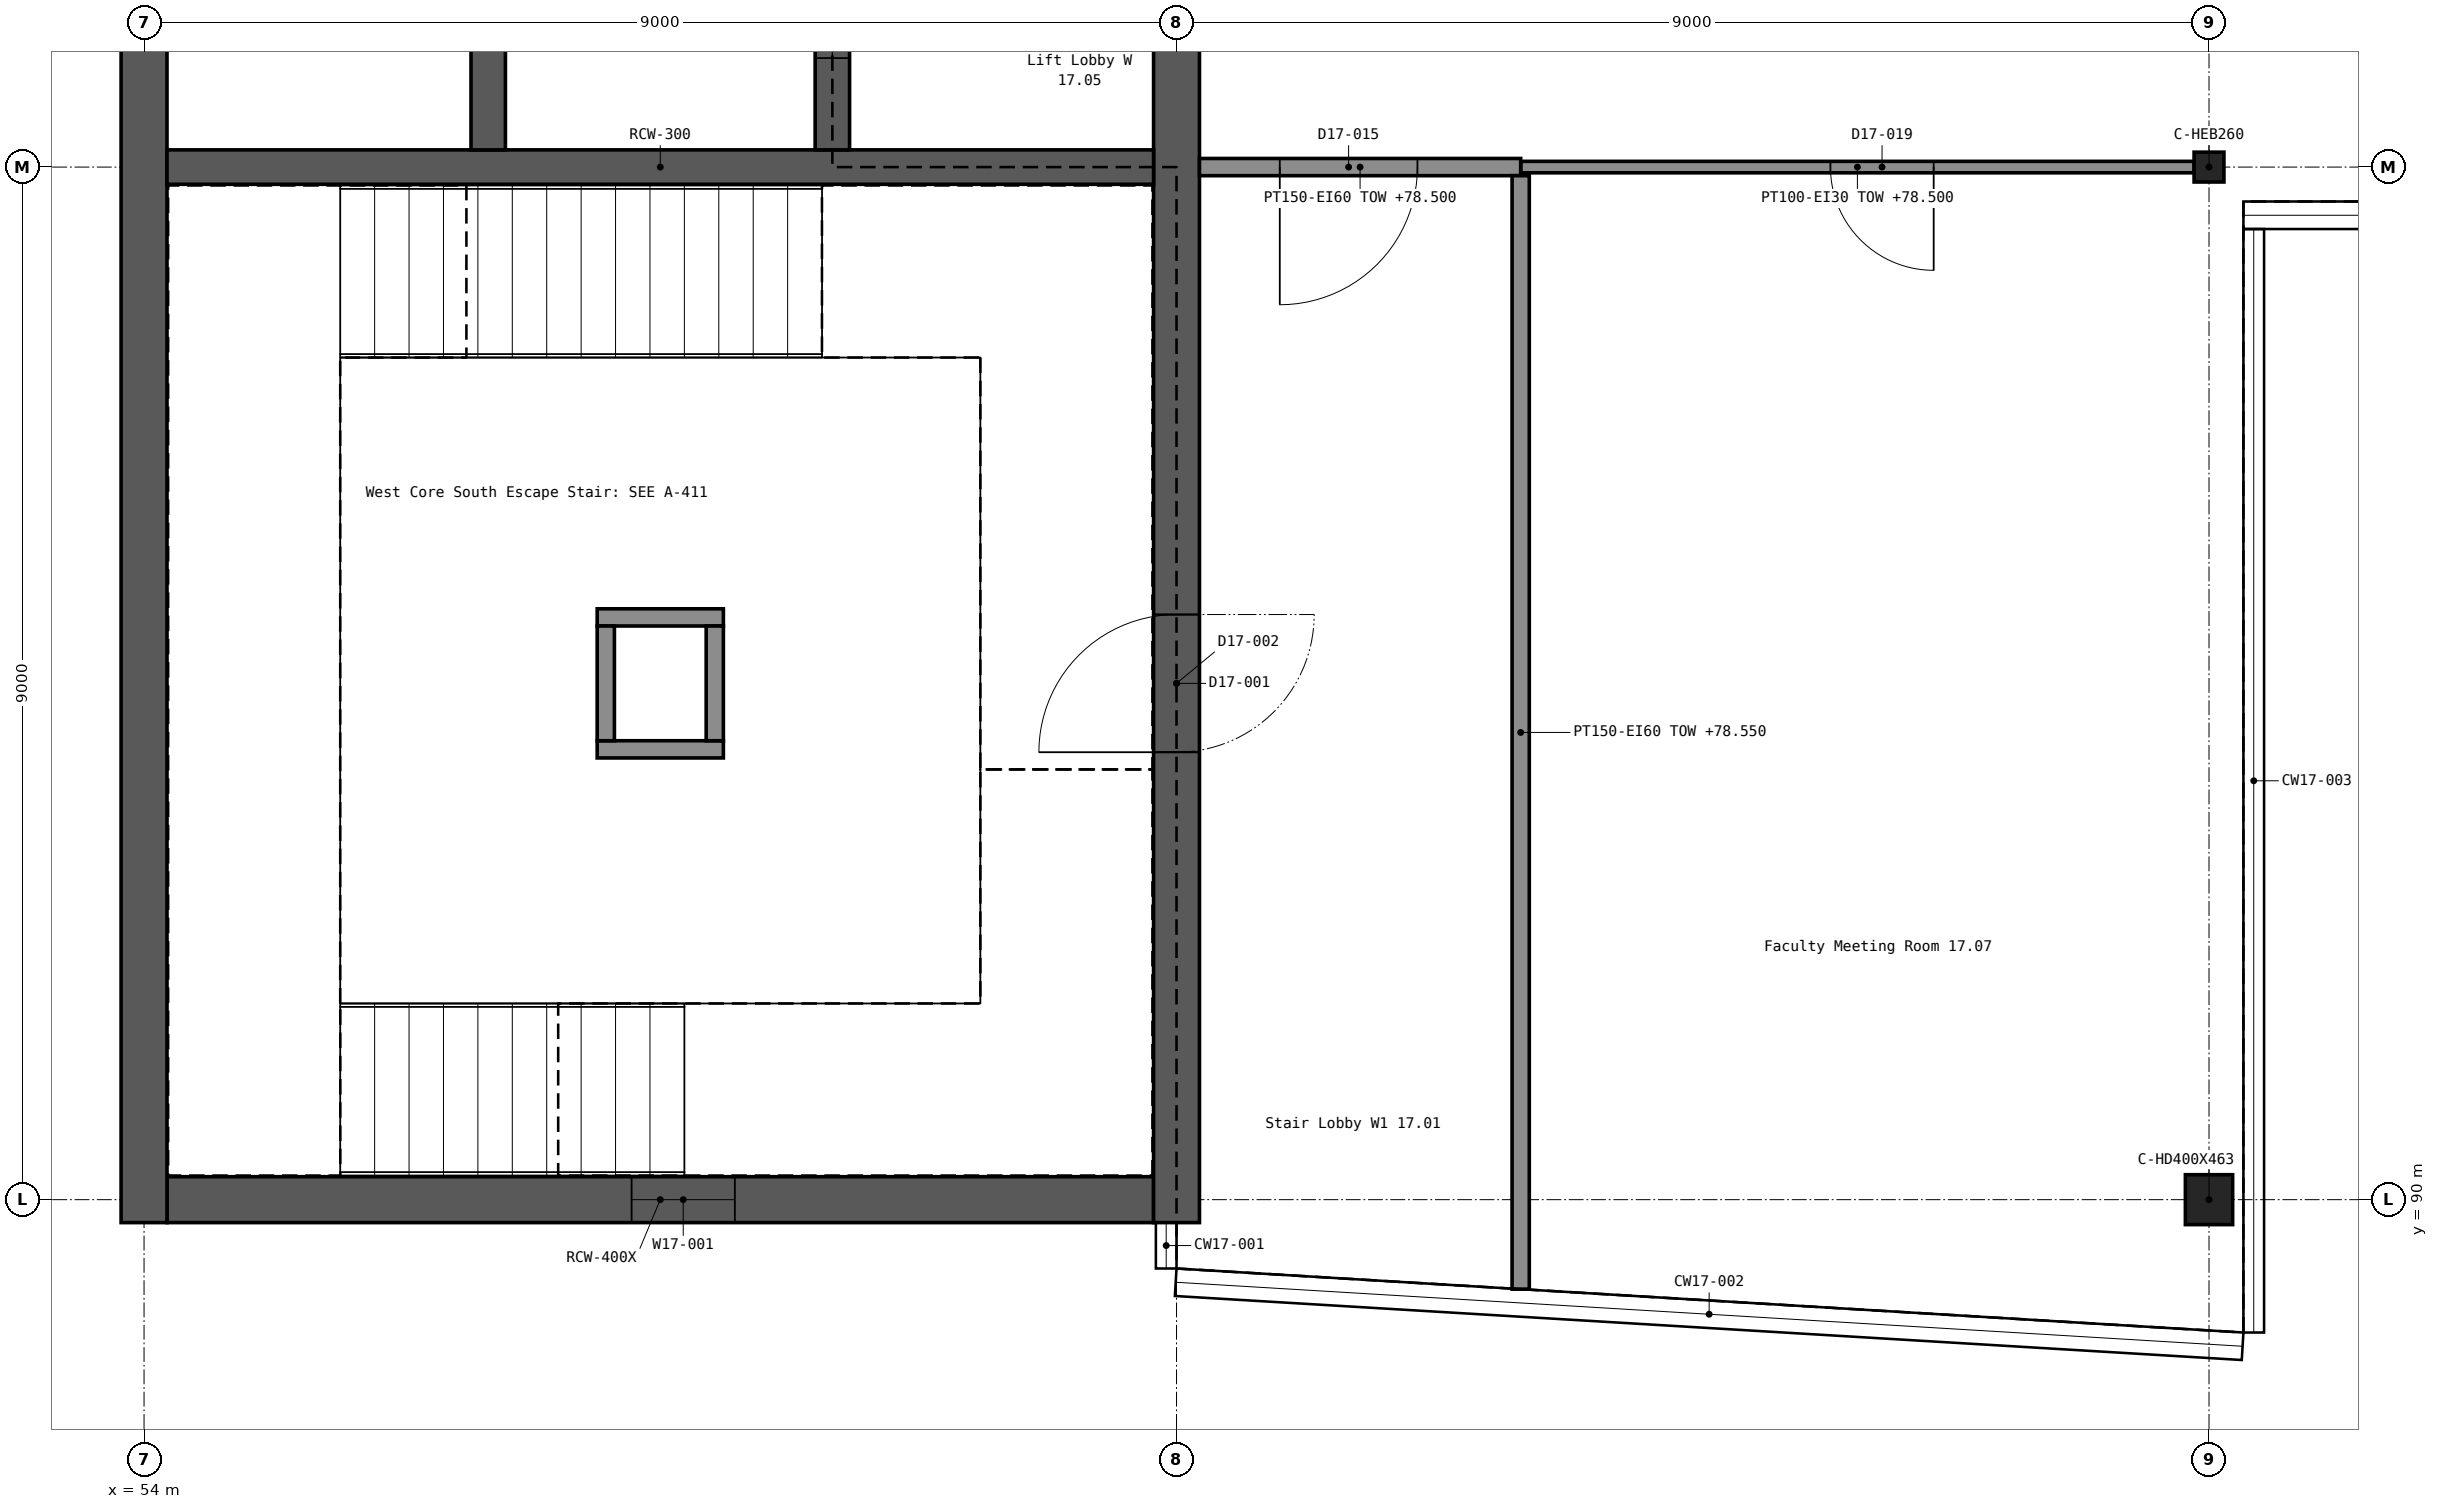
"""IFC4 building model, lengths in metres.
Left out: names, types, materials, properties, quantities, classifications, styles, units other than length and angle.
Written with IfcOpenShell. Run it as: python <this file> out.ifc"""

import sys

from ifc_helpers import new_model, si_unit, direction, frame, frame_2d, origin, origin_2d, place, context, subcontext, project, spatial, rectangle, i_section, extrude, element, fill, save


model = new_model("IFC4")
c1 = context("Model", 3, precision=1e-05, world=origin(), true_north=direction((0.0, 1.0)))
c2 = subcontext(c1, "Body", "Model", "MODEL_VIEW")
j1 = project(units=[si_unit("LENGTHUNIT", "METRE"), si_unit("PLANEANGLEUNIT", "RADIAN")], contexts=[c1])
p1 = place(None, origin())
s1 = spatial("IfcSite", under=j1, at=p1, CompositionType="ELEMENT")
p2 = place(p1, origin())
s2 = spatial("IfcBuilding", under=s1, at=p2, CompositionType="ELEMENT")
p3 = place(p2, frame((0.0, 0.0, 75.3)))
s3 = spatial("IfcBuildingStorey", under=s2, at=p3, CompositionType="ELEMENT", Elevation=75.3)
p4 = place(p3, frame((54.2, 90.0, 0.0), z_axis=(0.0, 0.0, 1.0), x_axis=(1.0, 0.0, 0.0)))
e1 = element("IfcWall", 1, at=p4, inside=s3, PredefinedType="SHEAR", context=c2, shape_type="SweptSolid", body=[
    extrude(rectangle(XDim=8.6, YDim=0.4, at=frame_2d((4.3, 0.0))), origin(), (0.0, 0.0, 1.0), 7.5),
])
p5 = place(p4, frame((4.05, 0.0, 1.2)))
e2 = element("IfcOpeningElement", 2, at=p5, cuts=e1, PredefinedType="OPENING", context=c2, shape_type="SweptSolid", body=[
    extrude(rectangle(XDim=0.9, YDim=1.5, at=frame_2d((0.45, 0.75))), frame((0.0, 0.211, 0.0), z_axis=(0.0, -1.0, 0.0), x_axis=(1.0, 0.0, 0.0)), (0.0, 0.0, 1.0), 0.422),
])
p6 = place(p3, frame((54.0, 89.8, 0.0), z_axis=(0.0, 0.0, 1.0), x_axis=(0.0, 1.0, 0.0)))
e3 = element("IfcWall", 3, at=p6, inside=s3, PredefinedType="SHEAR", context=c2, shape_type="SweptSolid", body=[
    extrude(rectangle(XDim=27.4, YDim=0.4, at=frame_2d((13.7, 0.0))), origin(), (0.0, 0.0, 1.0), 7.5),
])
p7 = place(p3, frame((63.0, 89.8, 0.0), z_axis=(0.0, 0.0, 1.0), x_axis=(0.0, 1.0, 0.0)))
e4 = element("IfcWall", 4, at=p7, inside=s3, PredefinedType="SHEAR", context=c2, shape_type="SweptSolid", body=[
    extrude(rectangle(XDim=27.4, YDim=0.4, at=frame_2d((13.7, 0.0))), origin(), (0.0, 0.0, 1.0), 7.5),
])
p8 = place(p7, frame((4.1, 0.0, 0.0)))
e5 = element("IfcOpeningElement", 5, at=p8, cuts=e4, PredefinedType="OPENING", context=c2, shape_type="SweptSolid", body=[
    extrude(rectangle(XDim=1.2, YDim=2.1, at=frame_2d((0.6, 1.05))), frame((0.0, 0.211, 0.0), z_axis=(0.0, -1.0, 0.0), x_axis=(1.0, 0.0, 0.0)), (0.0, 0.0, 1.0), 0.422),
])
p9 = place(p7, frame((4.1, 0.0, 3.9)))
e6 = element("IfcOpeningElement", 6, at=p9, cuts=e4, PredefinedType="OPENING", context=c2, shape_type="SweptSolid", body=[
    extrude(rectangle(XDim=1.2, YDim=2.1, at=frame_2d((0.6, 1.05))), frame((0.0, 0.211, 0.0), z_axis=(0.0, -1.0, 0.0), x_axis=(1.0, 0.0, 0.0)), (0.0, 0.0, 1.0), 0.422),
])
p10 = place(p7, frame((22.1, 0.0, 0.0)))
e7 = element("IfcOpeningElement", 7, at=p10, cuts=e4, PredefinedType="OPENING", context=c2, shape_type="SweptSolid", body=[
    extrude(rectangle(XDim=1.2, YDim=2.1, at=frame_2d((0.6, 1.05))), frame((0.0, 0.211, 0.0), z_axis=(0.0, -1.0, 0.0), x_axis=(1.0, 0.0, 0.0)), (0.0, 0.0, 1.0), 0.422),
])
p11 = place(p7, frame((22.1, 0.0, 3.9)))
e8 = element("IfcOpeningElement", 8, at=p11, cuts=e4, PredefinedType="OPENING", context=c2, shape_type="SweptSolid", body=[
    extrude(rectangle(XDim=1.2, YDim=2.1, at=frame_2d((0.6, 1.05))), frame((0.0, 0.211, 0.0), z_axis=(0.0, -1.0, 0.0), x_axis=(1.0, 0.0, 0.0)), (0.0, 0.0, 1.0), 0.422),
])
p12 = place(p7, frame((12.5, 0.0, 0.0)))
e9 = element("IfcOpeningElement", 9, at=p12, cuts=e4, PredefinedType="OPENING", context=c2, shape_type="SweptSolid", body=[
    extrude(rectangle(XDim=2.0, YDim=2.1, at=frame_2d((1.0, 1.05))), frame((0.0, 0.211, 0.0), z_axis=(0.0, -1.0, 0.0), x_axis=(1.0, 0.0, 0.0)), (0.0, 0.0, 1.0), 0.422),
])
p13 = place(p3, frame((54.2, 99.0, 0.0), z_axis=(0.0, 0.0, 1.0), x_axis=(1.0, 0.0, 0.0)))
e10 = element("IfcWall", 10, at=p13, inside=s3, PredefinedType="SHEAR", context=c2, shape_type="SweptSolid", body=[
    extrude(rectangle(XDim=8.6, YDim=0.3, at=frame_2d((4.3, 0.0))), origin(), (0.0, 0.0, 1.0), 7.5),
])
p14 = place(p3, frame((57.0, 99.15, 0.0), z_axis=(0.0, 0.0, 1.0), x_axis=(0.0, 1.0, 0.0)))
e11 = element("IfcWall", 11, at=p14, inside=s3, PredefinedType="SHEAR", context=c2, shape_type="SweptSolid", body=[
    extrude(rectangle(XDim=8.7, YDim=0.3, at=frame_2d((4.35, 0.0))), origin(), (0.0, 0.0, 1.0), 7.5),
])
p15 = place(p3, frame((60.0, 99.15, 0.0), z_axis=(0.0, 0.0, 1.0), x_axis=(0.0, 1.0, 0.0)))
e12 = element("IfcWall", 12, at=p15, inside=s3, PredefinedType="SHEAR", context=c2, shape_type="SweptSolid", body=[
    extrude(rectangle(XDim=8.7, YDim=0.3, at=frame_2d((4.35, 0.0))), origin(), (0.0, 0.0, 1.0), 7.5),
])
p16 = place(p15, frame((0.8, 0.0, 0.0)))
e13 = element("IfcOpeningElement", 13, at=p16, cuts=e12, PredefinedType="OPENING", context=c2, shape_type="SweptSolid", body=[
    extrude(rectangle(XDim=1.1, YDim=2.1, at=frame_2d((0.55, 1.05))), frame((0.0, 0.161, 0.0), z_axis=(0.0, -1.0, 0.0), x_axis=(1.0, 0.0, 0.0)), (0.0, 0.0, 1.0), 0.322),
])
p17 = place(p15, frame((3.8, 0.0, 0.0)))
e14 = element("IfcOpeningElement", 14, at=p17, cuts=e12, PredefinedType="OPENING", context=c2, shape_type="SweptSolid", body=[
    extrude(rectangle(XDim=1.1, YDim=2.1, at=frame_2d((0.55, 1.05))), frame((0.0, 0.161, 0.0), z_axis=(0.0, -1.0, 0.0), x_axis=(1.0, 0.0, 0.0)), (0.0, 0.0, 1.0), 0.322),
])
p18 = place(p15, frame((6.8, 0.0, 0.0)))
e15 = element("IfcOpeningElement", 15, at=p18, cuts=e12, PredefinedType="OPENING", context=c2, shape_type="SweptSolid", body=[
    extrude(rectangle(XDim=1.1, YDim=2.1, at=frame_2d((0.55, 1.05))), frame((0.0, 0.161, 0.0), z_axis=(0.0, -1.0, 0.0), x_axis=(1.0, 0.0, 0.0)), (0.0, 0.0, 1.0), 0.322),
])
p19 = place(p3, frame((72.0, 90.0, 0.0), z_axis=(0.0, 0.0, 1.0), x_axis=(1.0, 0.0, 0.0)))
e16 = element("IfcColumn", 16, at=p19, inside=s3, PredefinedType="COLUMN", context=c2, shape_type="SweptSolid", body=[
    extrude(i_section(OverallWidth=0.412, OverallDepth=0.435, WebThickness=0.036, FlangeThickness=0.057, FilletRadius=0.015, at=origin_2d()), origin(), (0.0, 0.0, 1.0), 3.9),
])
p20 = place(p3, frame((72.0, 99.0, 0.0), z_axis=(0.0, 0.0, 1.0), x_axis=(1.0, 0.0, 0.0)))
e17 = element("IfcColumn", 17, at=p20, inside=s3, PredefinedType="COLUMN", context=c2, shape_type="SweptSolid", body=[
    extrude(i_section(OverallWidth=0.26, OverallDepth=0.26, WebThickness=0.01, FlangeThickness=0.018, FilletRadius=0.024, at=origin_2d()), origin(), (0.0, 0.0, 1.0), 3.9),
])
p21 = place(p3, frame((63.125, 89.8, 3.9), z_axis=(0.0, 0.0, 1.0), x_axis=(0.0, -1.0, 0.0)))
e18 = element("IfcWall", 18, at=p21, inside=s3, PredefinedType="PARAPET", context=c2, shape_type="SweptSolid", body=[
    extrude(rectangle(XDim=0.415, YDim=0.25, at=frame_2d((0.208, 0.0))), origin(), (0.0, 0.0, 1.0), 1.1),
])
p22 = place(p3, frame((63.25, 89.51, 3.9), z_axis=(0.0, 0.0, 1.0), x_axis=(0.998206819367, -0.059859383295, 0.0)))
e19 = element("IfcWall", 19, at=p22, inside=s3, PredefinedType="PARAPET", context=c2, shape_type="SweptSolid", body=[
    extrude(rectangle(XDim=2.957, YDim=0.25, at=frame_2d((1.479, 0.0))), origin(), (0.0, 0.0, 1.0), 2.7),
])
p23 = place(p3, frame((66.201, 89.333, 3.9), z_axis=(0.0, 0.0, 1.0), x_axis=(0.998201585904, -0.059946592056, 0.0)))
e20 = element("IfcWall", 20, at=p23, inside=s3, PredefinedType="PARAPET", context=c2, shape_type="SweptSolid", body=[
    extrude(rectangle(XDim=2.957, YDim=0.25, at=frame_2d((1.479, 0.0))), origin(), (0.0, 0.0, 1.0), 3.1),
])
p24 = place(p3, frame((69.153, 89.156, 3.9), z_axis=(0.0, 0.0, 1.0), x_axis=(0.998206819367, -0.059859383295, 0.0)))
e21 = element("IfcWall", 21, at=p24, inside=s3, PredefinedType="PARAPET", context=c2, shape_type="SweptSolid", body=[
    extrude(rectangle(XDim=2.957, YDim=0.25, at=frame_2d((1.479, 0.0))), origin(), (0.0, 0.0, 1.0), 3.4),
])
p25 = place(p3, frame((72.104, 88.979, 3.9), z_axis=(0.0, 0.0, 1.0), x_axis=(0.998201585904, -0.059946592056, 0.0)))
e22 = element("IfcWall", 22, at=p25, inside=s3, PredefinedType="PARAPET", context=c2, shape_type="SweptSolid", body=[
    extrude(rectangle(XDim=2.957, YDim=0.25, at=frame_2d((1.479, 0.0))), origin(), (0.0, 0.0, 1.0), 3.6),
])
p26 = place(p3, frame((54.0, 89.85, 7.5), z_axis=(0.0, 0.0, 1.0), x_axis=(0.0, 1.0, 0.0)))
e23 = element("IfcWall", 23, at=p26, inside=s3, PredefinedType="PARAPET", context=c2, shape_type="SweptSolid", body=[
    extrude(rectangle(XDim=27.3, YDim=0.3, at=frame_2d((13.65, 0.0))), origin(), (0.0, 0.0, 1.0), 1.1),
])
p27 = place(p3, frame((63.0, 89.85, 7.5), z_axis=(0.0, 0.0, 1.0), x_axis=(0.0, 1.0, 0.0)))
e24 = element("IfcWall", 24, at=p27, inside=s3, PredefinedType="PARAPET", context=c2, shape_type="SweptSolid", body=[
    extrude(rectangle(XDim=8.55, YDim=0.3, at=frame_2d((4.275, 0.0))), origin(), (0.0, 0.0, 1.0), 1.1),
])
p28 = place(p3, frame((54.15, 90.0, 7.5), z_axis=(0.0, 0.0, 1.0), x_axis=(1.0, 0.0, 0.0)))
e25 = element("IfcWall", 25, at=p28, inside=s3, PredefinedType="PARAPET", context=c2, shape_type="SweptSolid", body=[
    extrude(rectangle(XDim=8.7, YDim=0.3, at=frame_2d((4.35, 0.0))), origin(), (0.0, 0.0, 1.0), 1.1),
])
for number, where, z_axis, x_axis in (
    (26, (57.95, 93.925, 7.5), (0.0, 0.0, 1.0), (1.0, 0.0, 0.0)),
    (27, (57.95, 95.075, 7.5), (0.0, 0.0, 1.0), (1.0, 0.0, 0.0)),
):
    element("IfcWall", number, at=place(p3, frame(where, z_axis=z_axis, x_axis=x_axis)), inside=s3, PredefinedType="SOLIDWALL", context=c2, shape_type="SweptSolid", body=[
        extrude(rectangle(XDim=1.1, YDim=0.15, at=frame_2d((0.55, 0.0))), origin(), (0.0, 0.0, 1.0), 0.15),
    ])
for number, where, z_axis, x_axis in (
    (28, (58.025, 94.0, 7.5), (0.0, 0.0, 1.0), (0.0, 1.0, 0.0)),
    (29, (58.975, 94.0, 7.5), (0.0, 0.0, 1.0), (0.0, 1.0, 0.0)),
):
    element("IfcWall", number, at=place(p3, frame(where, z_axis=z_axis, x_axis=x_axis)), inside=s3, PredefinedType="SOLIDWALL", context=c2, shape_type="SweptSolid", body=[
        extrude(rectangle(XDim=1.0, YDim=0.15, at=frame_2d((0.5, 0.0))), origin(), (0.0, 0.0, 1.0), 0.15),
    ])
p29 = place(p3, frame((66.0, 99.0, 0.0), z_axis=(0.0, 0.0, 1.0), x_axis=(1.0, 0.0, 0.0)))
e30 = element("IfcWall", 30, at=p29, inside=s3, PredefinedType="PARTITIONING", context=c2, shape_type="SweptSolid", body=[
    extrude(rectangle(XDim=5.87, YDim=0.1, at=frame_2d((2.935, 0.0))), origin(), (0.0, 0.0, 1.0), 3.2),
])
p30 = place(p29, frame((2.7, 0.0, 0.0)))
e31 = element("IfcOpeningElement", 31, at=p30, cuts=e30, PredefinedType="OPENING", context=c2, shape_type="SweptSolid", body=[
    extrude(rectangle(XDim=0.9, YDim=2.1, at=frame_2d((0.45, 1.05))), frame((0.0, 0.061, 0.0), z_axis=(0.0, -1.0, 0.0), x_axis=(1.0, 0.0, 0.0)), (0.0, 0.0, 1.0), 0.122),
])
p31 = place(p3, frame((63.2, 99.0, 0.0), z_axis=(0.0, 0.0, 1.0), x_axis=(1.0, 0.0, 0.0)))
e32 = element("IfcWall", 32, at=p31, inside=s3, PredefinedType="PARTITIONING", context=c2, shape_type="SweptSolid", body=[
    extrude(rectangle(XDim=2.8, YDim=0.15, at=frame_2d((1.4, 0.0))), origin(), (0.0, 0.0, 1.0), 3.2),
])
p32 = place(p31, frame((0.7, 0.0, 0.0)))
e33 = element("IfcOpeningElement", 33, at=p32, cuts=e32, PredefinedType="OPENING", context=c2, shape_type="SweptSolid", body=[
    extrude(rectangle(XDim=1.2, YDim=2.1, at=frame_2d((0.6, 1.05))), frame((0.0, 0.086, 0.0), z_axis=(0.0, -1.0, 0.0), x_axis=(1.0, 0.0, 0.0)), (0.0, 0.0, 1.0), 0.172),
])
p33 = place(p3, frame((66.0, 89.22, 0.0), z_axis=(0.0, 0.0, 1.0), x_axis=(0.0, 1.0, 0.0)))
e34 = element("IfcWall", 34, at=p33, inside=s3, PredefinedType="PARTITIONING", context=c2, shape_type="SweptSolid", body=[
    extrude(rectangle(XDim=9.705, YDim=0.15, at=frame_2d((4.853, 0.0))), origin(), (0.0, 0.0, 1.0), 3.25),
])
p34 = place(p5, origin())
e35 = element("IfcWindow", 35, at=p34, inside=s3, PartitioningType="SINGLE_PANEL", PredefinedType="WINDOW", context=c2, shape_type="SweptSolid", body=[
    extrude(rectangle(XDim=0.9, YDim=1.5, at=frame_2d((0.45, 0.75))), frame((0.0, 0.03, 0.0), z_axis=(0.0, -1.0, 0.0), x_axis=(1.0, 0.0, 0.0)), (0.0, 0.0, 1.0), 0.06),
])
fill(e2, e35)
p35 = place(p2, frame((0.0, 0.0, 82.5)))
p36 = place(p35, origin())
p37 = place(p36, frame((58.5, 94.5, 0.0)))
p38 = place(p37, frame((0.0, 0.0, 0.25)))
e36 = element("IfcWindow", 36, at=p38, inside=s3, PartitioningType="SINGLE_PANEL", PredefinedType="SKYLIGHT", context=c2, shape_type="SweptSolid", body=[
    extrude(rectangle(XDim=0.8, YDim=1.0, at=origin_2d()), origin(), (0.0, 0.0, 1.0), 0.05),
])
p39 = place(p8, origin())
e37 = element("IfcDoor", 37, at=p39, inside=s3, OperationType="SINGLE_SWING_LEFT", PredefinedType="DOOR", context=c2, shape_type="SweptSolid", body=[
    extrude(rectangle(XDim=1.2, YDim=2.1, at=frame_2d((0.6, 1.05))), frame((0.0, 0.025, 0.0), z_axis=(0.0, -1.0, 0.0), x_axis=(1.0, 0.0, 0.0)), (0.0, 0.0, 1.0), 0.05),
])
fill(e5, e37)
p40 = place(p9, frame((1.2, 0.0, 0.0), z_axis=(0.0, 0.0, 1.0), x_axis=(-1.0, 0.0, 0.0)))
e38 = element("IfcDoor", 38, at=p40, inside=s3, OperationType="SINGLE_SWING_LEFT", PredefinedType="DOOR", context=c2, shape_type="SweptSolid", body=[
    extrude(rectangle(XDim=1.2, YDim=2.1, at=frame_2d((0.6, 1.05))), frame((0.0, 0.025, 0.0), z_axis=(0.0, -1.0, 0.0), x_axis=(1.0, 0.0, 0.0)), (0.0, 0.0, 1.0), 0.05),
])
fill(e6, e38)
p41 = place(p16, origin())
e39 = element("IfcDoor", 39, at=p41, inside=s3, OperationType="DOUBLE_DOOR_SLIDING", PredefinedType="DOOR", context=c2, shape_type="SweptSolid", body=[
    extrude(rectangle(XDim=1.1, YDim=2.1, at=frame_2d((0.55, 1.05))), frame((0.0, 0.025, 0.0), z_axis=(0.0, -1.0, 0.0), x_axis=(1.0, 0.0, 0.0)), (0.0, 0.0, 1.0), 0.05),
])
fill(e13, e39)
p42 = place(p32, frame((1.2, 0.0, 0.0), z_axis=(0.0, 0.0, 1.0), x_axis=(-1.0, 0.0, 0.0)))
e40 = element("IfcDoor", 40, at=p42, inside=s3, OperationType="SINGLE_SWING_RIGHT", PredefinedType="DOOR", context=c2, shape_type="SweptSolid", body=[
    extrude(rectangle(XDim=1.2, YDim=2.1, at=frame_2d((0.6, 1.05))), frame((0.0, 0.025, 0.0), z_axis=(0.0, -1.0, 0.0), x_axis=(1.0, 0.0, 0.0)), (0.0, 0.0, 1.0), 0.05),
])
fill(e33, e40)
p43 = place(p30, frame((0.9, 0.0, 0.0), z_axis=(0.0, 0.0, 1.0), x_axis=(-1.0, 0.0, 0.0)))
e41 = element("IfcDoor", 41, at=p43, inside=s3, OperationType="SINGLE_SWING_LEFT", PredefinedType="DOOR", context=c2, shape_type="SweptSolid", body=[
    extrude(rectangle(XDim=0.9, YDim=2.1, at=frame_2d((0.45, 1.05))), frame((0.0, 0.025, 0.0), z_axis=(0.0, -1.0, 0.0), x_axis=(1.0, 0.0, 0.0)), (0.0, 0.0, 1.0), 0.05),
])
fill(e31, e41)
save(model, sys.argv[1])
